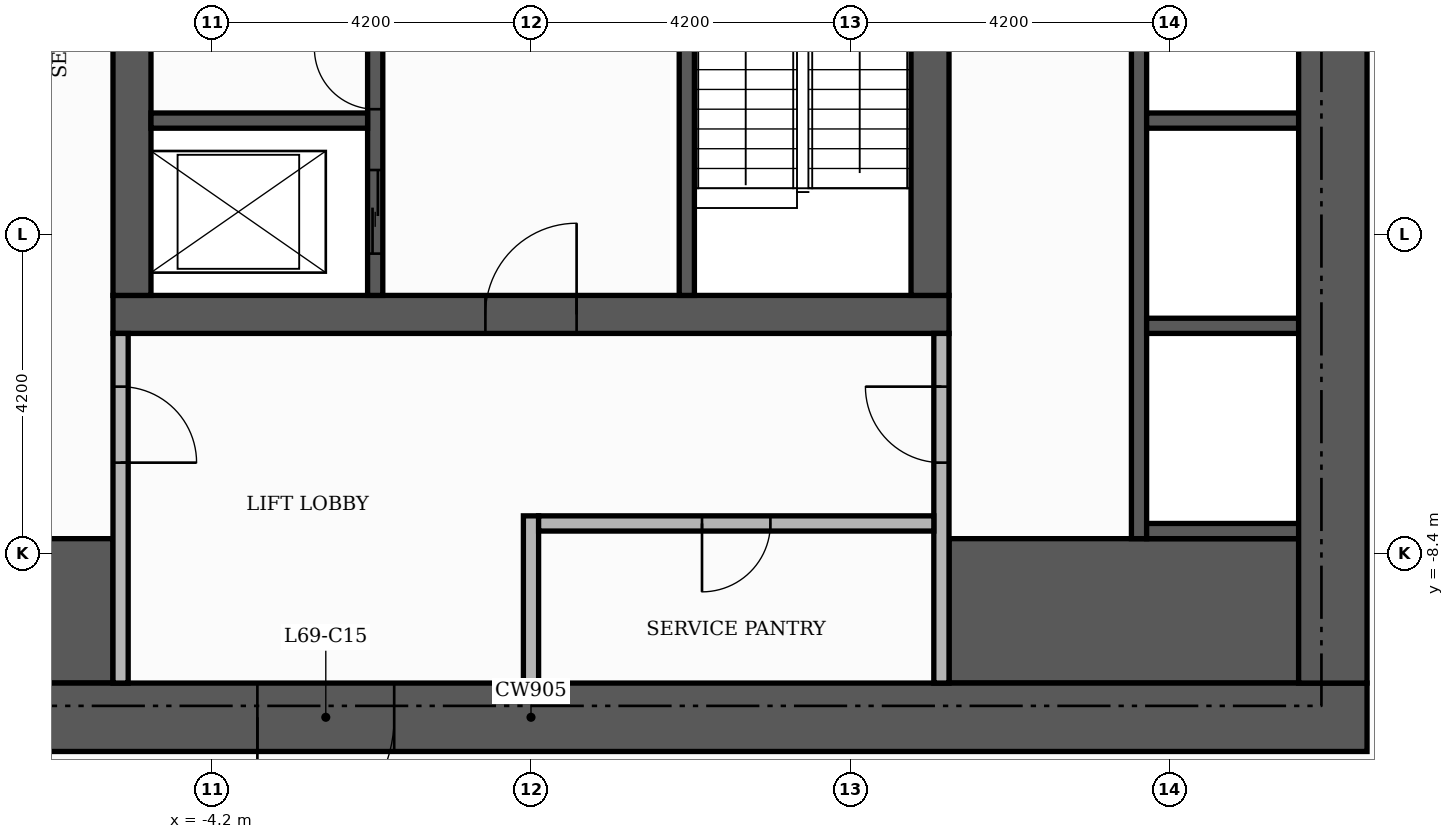
"""IFC4 building model, lengths in metres.
Left out: names, types, materials, properties, quantities, classifications, styles, units other than length and angle.
Written with IfcOpenShell. Run it as: python <this file> out.ifc"""

import sys

from ifc_helpers import new_model, si_unit, direction, frame, frame_2d, origin, place, context, subcontext, project, spatial, rectangle, extrude, element, fill, save


model = new_model("IFC4")
c1 = context("Model", 3, precision=1e-05, world=origin(), true_north=direction((0.0, 1.0)))
c2 = subcontext(c1, "Body", "Model", "MODEL_VIEW")
j1 = project(units=[si_unit("LENGTHUNIT", "METRE"), si_unit("PLANEANGLEUNIT", "RADIAN")], contexts=[c1])
p1 = place(None, origin())
s1 = spatial("IfcSite", under=j1, at=p1, CompositionType="ELEMENT")
p2 = place(p1, origin())
s2 = spatial("IfcBuilding", under=s1, at=p2, CompositionType="ELEMENT")
p3 = place(p2, frame((0.0, 0.0, 287.4)))
s3 = spatial("IfcBuildingStorey", under=s2, at=p3, CompositionType="ELEMENT", Elevation=287.4)
p4 = place(p3, frame((-5.5, -5.25, 0.0), z_axis=(0.0, 0.0, 1.0), x_axis=(1.0, 0.0, 0.0)))
e1 = element("IfcWall", 1, at=p4, inside=s3, PredefinedType="SHEAR", context=c2, shape_type="SweptSolid", body=[
    extrude(rectangle(XDim=11.0, YDim=0.5, at=frame_2d((5.5, 0.0))), origin(), (0.0, 0.0, 1.0), 5.05),
])
p5 = place(p4, frame((4.9, 0.0, 0.0)))
e2 = element("IfcOpeningElement", 2, at=p5, cuts=e1, PredefinedType="OPENING", context=c2, shape_type="SweptSolid", body=[
    extrude(rectangle(XDim=1.2, YDim=2.1, at=frame_2d((0.6, 1.05))), frame((0.0, 0.26, 0.0), z_axis=(0.0, -1.0, 0.0), x_axis=(1.0, 0.0, 0.0)), (0.0, 0.0, 1.0), 0.52),
])
for number, where, z_axis, x_axis in (
    (3, (-5.25, -5.0, 0.0), (0.0, 0.0, 1.0), (0.0, 1.0, 0.0)),
    (4, (5.25, -5.0, 0.0), (0.0, 0.0, 1.0), (0.0, 1.0, 0.0)),
):
    element("IfcWall", number, at=place(p3, frame(where, z_axis=z_axis, x_axis=x_axis)), inside=s3, PredefinedType="SHEAR", context=c2, shape_type="SweptSolid", body=[
        extrude(rectangle(XDim=10.5, YDim=0.5, at=frame_2d((5.25, 0.0))), origin(), (0.0, 0.0, 1.0), 5.05),
    ])
for number, where, z_axis, x_axis in (
    (5, (-10.1, -9.15, 0.0), (0.0, 0.0, 1.0), (1.0, 0.0, 0.0)),
    (6, (5.5, -9.15, 0.0), (0.0, 0.0, 1.0), (1.0, 0.0, 0.0)),
):
    element("IfcWall", number, at=place(p3, frame(where, z_axis=z_axis, x_axis=x_axis)), inside=s3, PredefinedType="SHEAR", context=c2, shape_type="SweptSolid", body=[
        extrude(rectangle(XDim=4.6, YDim=1.9, at=frame_2d((2.3, 0.0))), origin(), (0.0, 0.0, 1.0), 5.05),
    ])
p6 = place(p3, frame((2.05, -5.0, 0.0), z_axis=(0.0, 0.0, 1.0), x_axis=(0.0, 1.0, 0.0)))
e7 = element("IfcWall", 7, at=p6, inside=s3, PredefinedType="SHEAR", context=c2, shape_type="SweptSolid", body=[
    extrude(rectangle(XDim=6.6, YDim=0.2, at=frame_2d((3.3, 0.0))), origin(), (0.0, 0.0, 1.0), 5.05),
])
p7 = place(p6, frame((5.25, 0.0, 0.0)))
e8 = element("IfcOpeningElement", 8, at=p7, cuts=e7, PredefinedType="OPENING", context=c2, shape_type="SweptSolid", body=[
    extrude(rectangle(XDim=1.0, YDim=2.1, at=frame_2d((0.5, 1.05))), frame((0.0, 0.11, 0.0), z_axis=(0.0, -1.0, 0.0), x_axis=(1.0, 0.0, 0.0)), (0.0, 0.0, 1.0), 0.22),
])
p8 = place(p3, frame((8.0, -8.2, 0.0), z_axis=(0.0, 0.0, 1.0), x_axis=(0.0, 1.0, 0.0)))
e9 = element("IfcWall", 9, at=p8, inside=s3, PredefinedType="SHEAR", context=c2, shape_type="SweptSolid", body=[
    extrude(rectangle(XDim=16.4, YDim=0.2, at=frame_2d((8.2, 0.0))), origin(), (0.0, 0.0, 1.0), 5.05),
])
for number, where, z_axis, x_axis in (
    (10, (8.1, -8.1, 0.0), (0.0, 0.0, 1.0), (1.0, 0.0, 0.0)),
    (11, (8.1, -5.4, 0.0), (0.0, 0.0, 1.0), (1.0, 0.0, 0.0)),
):
    element("IfcWall", number, at=place(p3, frame(where, z_axis=z_axis, x_axis=x_axis)), inside=s3, PredefinedType="SHEAR", context=c2, shape_type="SweptSolid", body=[
        extrude(rectangle(XDim=2.0, YDim=0.2, at=frame_2d((1.0, 0.0))), origin(), (0.0, 0.0, 1.0), 5.05),
    ])
p9 = place(p3, frame((-2.05, -5.0, 0.0), z_axis=(0.0, 0.0, 1.0), x_axis=(0.0, 1.0, 0.0)))
e12 = element("IfcWall", 12, at=p9, inside=s3, PredefinedType="SHEAR", context=c2, shape_type="SweptSolid", body=[
    extrude(rectangle(XDim=3.4, YDim=0.2, at=frame_2d((1.7, 0.0))), origin(), (0.0, 0.0, 1.0), 5.05),
])
p10 = place(p9, frame((0.55, 0.0, 0.0)))
e13 = element("IfcOpeningElement", 13, at=p10, cuts=e12, PredefinedType="OPENING", context=c2, shape_type="SweptSolid", body=[
    extrude(rectangle(XDim=1.1, YDim=2.1, at=frame_2d((0.55, 1.05))), frame((0.0, 0.11, 0.0), z_axis=(0.0, -1.0, 0.0), x_axis=(1.0, 0.0, 0.0)), (0.0, 0.0, 1.0), 0.22),
])
p11 = place(p9, frame((2.45, 0.0, 0.0)))
e14 = element("IfcOpeningElement", 14, at=p11, cuts=e12, PredefinedType="OPENING", context=c2, shape_type="SweptSolid", body=[
    extrude(rectangle(XDim=0.8, YDim=2.1, at=frame_2d((0.4, 1.05))), frame((0.0, 0.11, 0.0), z_axis=(0.0, -1.0, 0.0), x_axis=(1.0, 0.0, 0.0)), (0.0, 0.0, 1.0), 0.22),
])
p12 = place(p3, frame((-5.0, -2.7, 0.0), z_axis=(0.0, 0.0, 1.0), x_axis=(1.0, 0.0, 0.0)))
e15 = element("IfcWall", 15, at=p12, inside=s3, PredefinedType="SHEAR", context=c2, shape_type="SweptSolid", body=[
    extrude(rectangle(XDim=2.85, YDim=0.2, at=frame_2d((1.425, 0.0))), origin(), (0.0, 0.0, 1.0), 5.05),
])
p13 = place(p3, frame((8.1, -2.7, 0.0), z_axis=(0.0, 0.0, 1.0), x_axis=(1.0, 0.0, 0.0)))
e16 = element("IfcWall", 16, at=p13, inside=s3, PredefinedType="SHEAR", context=c2, shape_type="SweptSolid", body=[
    extrude(rectangle(XDim=2.0, YDim=0.2, at=frame_2d((1.0, 0.0))), origin(), (0.0, 0.0, 1.0), 5.05),
])
p14 = place(p3, frame((-11.0, -10.55, 0.0), z_axis=(0.0, 0.0, 1.0), x_axis=(1.0, 0.0, 0.0)))
e17 = element("IfcWall", 17, at=p14, inside=s3, PredefinedType="SHEAR", context=c2, shape_type="SweptSolid", body=[
    extrude(rectangle(XDim=22.0, YDim=0.9, at=frame_2d((11.0, 0.0))), origin(), (0.0, 0.0, 1.0), 5.05),
])
p15 = place(p14, frame((7.4, 0.0, 0.0)))
e18 = element("IfcOpeningElement", 18, at=p15, cuts=e17, PredefinedType="OPENING", context=c2, shape_type="SweptSolid", body=[
    extrude(rectangle(XDim=1.8, YDim=2.2, at=frame_2d((0.9, 1.1))), frame((0.0, 0.46, 0.0), z_axis=(0.0, -1.0, 0.0), x_axis=(1.0, 0.0, 0.0)), (0.0, 0.0, 1.0), 0.92),
])
p16 = place(p3, frame((10.55, -10.1, 0.0), z_axis=(0.0, 0.0, 1.0), x_axis=(0.0, 1.0, 0.0)))
e19 = element("IfcWall", 19, at=p16, inside=s3, PredefinedType="SHEAR", context=c2, shape_type="SweptSolid", body=[
    extrude(rectangle(XDim=20.2, YDim=0.9, at=frame_2d((10.1, 0.0))), origin(), (0.0, 0.0, 1.0), 5.05),
])
p17 = place(p3, frame((-5.4, -10.1, 0.0), z_axis=(0.0, 0.0, 1.0), x_axis=(0.0, 1.0, 0.0)))
e20 = element("IfcWall", 20, at=p17, inside=s3, PredefinedType="PARTITIONING", context=c2, shape_type="SweptSolid", body=[
    extrude(rectangle(XDim=4.6, YDim=0.2, at=frame_2d((2.3, 0.0))), origin(), (0.0, 0.0, 1.0), 5.05),
])
p18 = place(p17, frame((2.9, 0.0, 0.0)))
e21 = element("IfcOpeningElement", 21, at=p18, cuts=e20, PredefinedType="OPENING", context=c2, shape_type="SweptSolid", body=[
    extrude(rectangle(XDim=1.0, YDim=2.1, at=frame_2d((0.5, 1.05))), frame((0.0, 0.11, 0.0), z_axis=(0.0, -1.0, 0.0), x_axis=(1.0, 0.0, 0.0)), (0.0, 0.0, 1.0), 0.22),
])
p19 = place(p3, frame((0.0, -10.1, 0.0), z_axis=(0.0, 0.0, 1.0), x_axis=(0.0, 1.0, 0.0)))
e22 = element("IfcWall", 22, at=p19, inside=s3, PredefinedType="PARTITIONING", context=c2, shape_type="SweptSolid", body=[
    extrude(rectangle(XDim=2.2, YDim=0.2, at=frame_2d((1.1, 0.0))), origin(), (0.0, 0.0, 1.0), 5.05),
])
p20 = place(p3, frame((5.4, -10.1, 0.0), z_axis=(0.0, 0.0, 1.0), x_axis=(0.0, 1.0, 0.0)))
e23 = element("IfcWall", 23, at=p20, inside=s3, PredefinedType="PARTITIONING", context=c2, shape_type="SweptSolid", body=[
    extrude(rectangle(XDim=4.6, YDim=0.2, at=frame_2d((2.3, 0.0))), origin(), (0.0, 0.0, 1.0), 5.05),
])
p21 = place(p20, frame((2.9, 0.0, 0.0)))
e24 = element("IfcOpeningElement", 24, at=p21, cuts=e23, PredefinedType="OPENING", context=c2, shape_type="SweptSolid", body=[
    extrude(rectangle(XDim=1.0, YDim=2.1, at=frame_2d((0.5, 1.05))), frame((0.0, 0.11, 0.0), z_axis=(0.0, -1.0, 0.0), x_axis=(1.0, 0.0, 0.0)), (0.0, 0.0, 1.0), 0.22),
])
p22 = place(p3, frame((0.1, -8.0, 0.0), z_axis=(0.0, 0.0, 1.0), x_axis=(1.0, 0.0, 0.0)))
e25 = element("IfcWall", 25, at=p22, inside=s3, PredefinedType="PARTITIONING", context=c2, shape_type="SweptSolid", body=[
    extrude(rectangle(XDim=5.2, YDim=0.2, at=frame_2d((2.6, 0.0))), origin(), (0.0, 0.0, 1.0), 5.05),
])
p23 = place(p22, frame((2.15, 0.0, 0.0)))
e26 = element("IfcOpeningElement", 26, at=p23, cuts=e25, PredefinedType="OPENING", context=c2, shape_type="SweptSolid", body=[
    extrude(rectangle(XDim=0.9, YDim=2.1, at=frame_2d((0.45, 1.05))), frame((0.0, 0.11, 0.0), z_axis=(0.0, -1.0, 0.0), x_axis=(1.0, 0.0, 0.0)), (0.0, 0.0, 1.0), 0.22),
])
p24 = place(p10, origin())
e27 = element("IfcDoor", 27, at=p24, inside=s3, OperationType="SLIDING_TO_LEFT", PredefinedType="DOOR", context=c2, shape_type="SweptSolid", body=[
    extrude(rectangle(XDim=1.1, YDim=2.1, at=frame_2d((0.55, 1.05))), frame((0.0, 0.025, 0.0), z_axis=(0.0, -1.0, 0.0), x_axis=(1.0, 0.0, 0.0)), (0.0, 0.0, 1.0), 0.05),
])
fill(e13, e27)
p25 = place(p11, origin())
e28 = element("IfcDoor", 28, at=p25, inside=s3, OperationType="SINGLE_SWING_RIGHT", PredefinedType="DOOR", context=c2, shape_type="SweptSolid", body=[
    extrude(rectangle(XDim=0.8, YDim=2.1, at=frame_2d((0.4, 1.05))), frame((0.0, 0.025, 0.0), z_axis=(0.0, -1.0, 0.0), x_axis=(1.0, 0.0, 0.0)), (0.0, 0.0, 1.0), 0.05),
])
fill(e14, e28)
p26 = place(p5, origin())
e29 = element("IfcDoor", 29, at=p26, inside=s3, OperationType="SINGLE_SWING_RIGHT", PredefinedType="DOOR", context=c2, shape_type="SweptSolid", body=[
    extrude(rectangle(XDim=1.2, YDim=2.1, at=frame_2d((0.6, 1.05))), frame((0.0, 0.025, 0.0), z_axis=(0.0, -1.0, 0.0), x_axis=(1.0, 0.0, 0.0)), (0.0, 0.0, 1.0), 0.05),
])
fill(e2, e29)
p27 = place(p18, frame((1.0, 0.0, 0.0), z_axis=(0.0, 0.0, 1.0), x_axis=(-1.0, 0.0, 0.0)))
e30 = element("IfcDoor", 30, at=p27, inside=s3, OperationType="SINGLE_SWING_LEFT", PredefinedType="DOOR", context=c2, shape_type="SweptSolid", body=[
    extrude(rectangle(XDim=1.0, YDim=2.1, at=frame_2d((0.5, 1.05))), frame((0.0, 0.025, 0.0), z_axis=(0.0, -1.0, 0.0), x_axis=(1.0, 0.0, 0.0)), (0.0, 0.0, 1.0), 0.05),
])
fill(e21, e30)
p28 = place(p21, origin())
e31 = element("IfcDoor", 31, at=p28, inside=s3, OperationType="SINGLE_SWING_RIGHT", PredefinedType="DOOR", context=c2, shape_type="SweptSolid", body=[
    extrude(rectangle(XDim=1.0, YDim=2.1, at=frame_2d((0.5, 1.05))), frame((0.0, 0.025, 0.0), z_axis=(0.0, -1.0, 0.0), x_axis=(1.0, 0.0, 0.0)), (0.0, 0.0, 1.0), 0.05),
])
fill(e24, e31)
p29 = place(p15, frame((1.8, 0.0, 0.0), z_axis=(0.0, 0.0, 1.0), x_axis=(-1.0, 0.0, 0.0)))
e32 = element("IfcDoor", 32, at=p29, inside=s3, OperationType="DOUBLE_DOOR_SINGLE_SWING", PredefinedType="DOOR", context=c2, shape_type="SweptSolid", body=[
    extrude(rectangle(XDim=1.8, YDim=2.2, at=frame_2d((0.9, 1.1))), frame((0.0, 0.025, 0.0), z_axis=(0.0, -1.0, 0.0), x_axis=(1.0, 0.0, 0.0)), (0.0, 0.0, 1.0), 0.05),
])
fill(e18, e32)
p30 = place(p23, frame((0.9, 0.0, 0.0), z_axis=(0.0, 0.0, 1.0), x_axis=(-1.0, 0.0, 0.0)))
e33 = element("IfcDoor", 33, at=p30, inside=s3, OperationType="SINGLE_SWING_LEFT", PredefinedType="DOOR", context=c2, shape_type="SweptSolid", body=[
    extrude(rectangle(XDim=0.9, YDim=2.1, at=frame_2d((0.45, 1.05))), frame((0.0, 0.025, 0.0), z_axis=(0.0, -1.0, 0.0), x_axis=(1.0, 0.0, 0.0)), (0.0, 0.0, 1.0), 0.05),
])
fill(e26, e33)
save(model, sys.argv[1])
